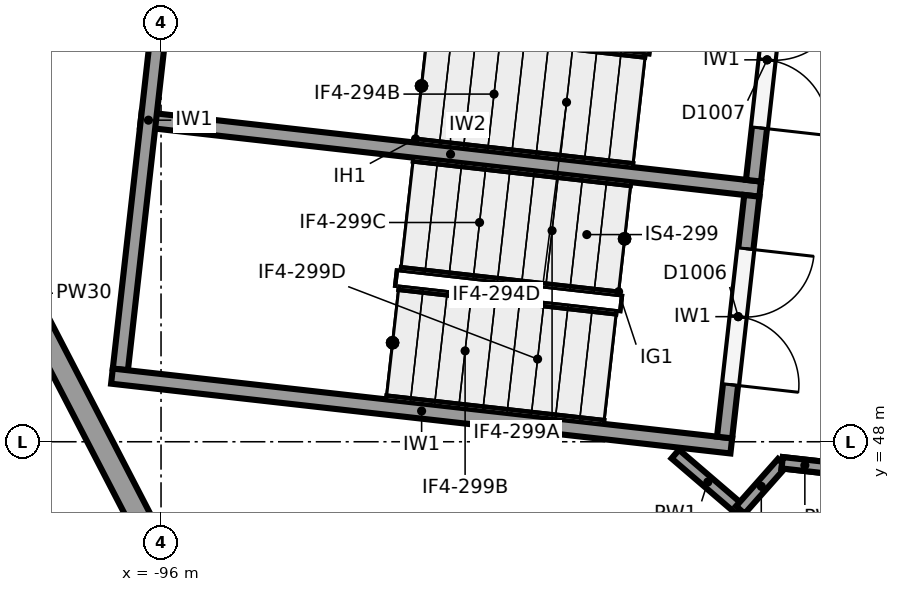
"""IFC4 building model, lengths in metres.
Left out: names, types, materials, properties, quantities, classifications, styles, units other than length and angle.
Written with IfcOpenShell. Run it as: python <this file> out.ifc"""

import sys

from ifc_helpers import new_model, si_unit, direction, frame, frame_2d, origin, place, context, subcontext, project, spatial, rectangle, extrude, element, fill, save


model = new_model("IFC4")
c1 = context("Model", 3, precision=1e-05, world=origin(), true_north=direction((0.0, 1.0)))
c2 = subcontext(c1, "Body", "Model", "MODEL_VIEW")
j1 = project(units=[si_unit("LENGTHUNIT", "METRE"), si_unit("PLANEANGLEUNIT", "RADIAN")], contexts=[c1])
p1 = place(None, origin())
s1 = spatial("IfcSite", under=j1, at=p1, CompositionType="ELEMENT")
p2 = place(p1, origin())
s2 = spatial("IfcBuilding", under=s1, at=p2, CompositionType="ELEMENT")
p3 = place(p2, frame((0.0, 0.0, 12.0)))
s3 = spatial("IfcBuildingStorey", under=s2, at=p3, CompositionType="ELEMENT", Elevation=12.0)
p4 = place(p3, frame((-94.807, 44.149, 0.0), z_axis=(0.0, 0.0, 1.0), x_axis=(-0.460021193284, 0.887907935391, 0.0)))
e1 = element("IfcWall", 1, at=p4, inside=s3, PredefinedType="SOLIDWALL", context=c2, shape_type="SweptSolid", body=[
    extrude(rectangle(XDim=13.075, YDim=0.3, at=frame_2d((6.538, 0.0))), origin(), (0.0, 0.0, 1.0), 4.35),
])
p5 = place(p3, frame((-96.646, 48.863, 0.0), z_axis=(0.0, 0.0, 1.0), x_axis=(0.993714104693, -0.111947658007, 0.0)))
e2 = element("IfcWall", 2, at=p5, inside=s3, PredefinedType="SHEAR", context=c2, shape_type="SweptSolid", body=[
    extrude(rectangle(XDim=8.2, YDim=0.2, at=frame_2d((4.1, 0.0))), origin(), (0.0, 0.0, 1.0), 5.65),
])
p6 = place(p3, frame((-95.796, 55.51, 0.0), z_axis=(0.0, 0.0, 1.0), x_axis=(-0.111970106426, -0.993711575492, 0.0)))
e3 = element("IfcWall", 3, at=p6, inside=s3, PredefinedType="SHEAR", context=c2, shape_type="SweptSolid", body=[
    extrude(rectangle(XDim=6.6, YDim=0.2, at=frame_2d((3.3, 0.0))), origin(), (0.0, 0.0, 1.0), 5.65),
])
p7 = place(p3, frame((-96.265, 52.242, 0.0), z_axis=(0.0, 0.0, 1.0), x_axis=(0.993713731549, -0.111950970206, 0.0)))
e4 = element("IfcWall", 4, at=p7, inside=s3, PredefinedType="SHEAR", context=c2, shape_type="SweptSolid", body=[
    extrude(rectangle(XDim=8.2, YDim=0.2, at=frame_2d((4.1, 0.0))), origin(), (0.0, 0.0, 1.0), 5.65),
])
p8 = place(p3, frame((-87.846, 54.614, 0.0), z_axis=(0.0, 0.0, 1.0), x_axis=(-0.112005735442, -0.993707560215, 0.0)))
e5 = element("IfcWall", 5, at=p8, inside=s3, PredefinedType="SHEAR", context=c2, shape_type="SweptSolid", body=[
    extrude(rectangle(XDim=3.2, YDim=0.2, at=frame_2d((1.6, 0.0))), origin(), (0.0, 0.0, 1.0), 5.65),
])
p9 = place(p8, frame((0.7, 0.0, 0.0)))
e6 = element("IfcOpeningElement", 6, at=p9, cuts=e5, PredefinedType="OPENING", context=c2, shape_type="SweptSolid", body=[
    extrude(rectangle(XDim=1.8, YDim=2.1, at=frame_2d((0.9, 1.05))), frame((0.0, 0.11, 0.0), z_axis=(0.0, -1.0, 0.0), x_axis=(1.0, 0.0, 0.0)), (0.0, 0.0, 1.0), 0.22),
])
p10 = place(p3, frame((-88.227, 51.236, 0.0), z_axis=(0.0, 0.0, 1.0), x_axis=(-0.111930393474, -0.993716049491, 0.0)))
e7 = element("IfcWall", 7, at=p10, inside=s3, PredefinedType="SHEAR", context=c2, shape_type="SweptSolid", body=[
    extrude(rectangle(XDim=3.2, YDim=0.2, at=frame_2d((1.6, 0.0))), origin(), (0.0, 0.0, 1.0), 5.65),
])
p11 = place(p10, frame((0.7, 0.0, 0.0)))
e8 = element("IfcOpeningElement", 8, at=p11, cuts=e7, PredefinedType="OPENING", context=c2, shape_type="SweptSolid", body=[
    extrude(rectangle(XDim=1.8, YDim=2.1, at=frame_2d((0.9, 1.05))), frame((0.0, 0.11, 0.0), z_axis=(0.0, -1.0, 0.0), x_axis=(1.0, 0.0, 0.0)), (0.0, 0.0, 1.0), 0.22),
])
p12 = place(p3, frame((-89.234, 47.837, 0.0), z_axis=(0.0, 0.0, 1.0), x_axis=(0.758950911089, -0.651147843855, 0.0)))
e9 = element("IfcWall", 9, at=p12, inside=s3, PredefinedType="PARTITIONING", context=c2, shape_type="SweptSolid", body=[
    extrude(rectangle(XDim=1.128, YDim=0.15, at=frame_2d((0.564, 0.0))), origin(), (0.0, 0.0, 1.0), 5.65),
])
p13 = place(p3, frame((-88.378, 47.103, 0.0), z_axis=(0.0, 0.0, 1.0), x_axis=(0.66330376879, 0.748350259109, 0.0)))
e10 = element("IfcWall", 10, at=p13, inside=s3, PredefinedType="PARTITIONING", context=c2, shape_type="SweptSolid", body=[
    extrude(rectangle(XDim=0.83, YDim=0.15, at=frame_2d((0.415, 0.0))), origin(), (0.0, 0.0, 1.0), 5.65),
])
p14 = place(p3, frame((-87.827, 47.724, 0.0), z_axis=(0.0, 0.0, 1.0), x_axis=(0.993708869306, -0.11199412066, 0.0)))
e11 = element("IfcWall", 11, at=p14, inside=s3, PredefinedType="PARTITIONING", context=c2, shape_type="SweptSolid", body=[
    extrude(rectangle(XDim=3.704, YDim=0.15, at=frame_2d((1.852, 0.0))), origin(), (0.0, 0.0, 1.0), 4.55),
])
p15 = place(p14, frame((0.65, 0.0, 0.0)))
e12 = element("IfcOpeningElement", 12, at=p15, cuts=e11, PredefinedType="OPENING", context=c2, shape_type="SweptSolid", body=[
    extrude(rectangle(XDim=1.8, YDim=2.1, at=frame_2d((0.9, 1.05))), frame((0.0, 0.085, 0.0), z_axis=(0.0, -1.0, 0.0), x_axis=(1.0, 0.0, 0.0)), (0.0, 0.0, 1.0), 0.17),
])
p16 = place(p3, frame((-87.827, 47.724, 4.55), z_axis=(0.0, 0.0, 1.0), x_axis=(0.993673547442, -0.112307083986, 0.0)))
e13 = element("IfcWall", 13, at=p16, inside=s3, PredefinedType="PARTITIONING", context=c2, shape_type="SweptSolid", body=[
    extrude(rectangle(XDim=0.6, YDim=0.15, at=frame_2d((0.3, 0.0))), origin(), (0.0, 0.0, 1.0), 1.1),
])
p17 = place(p9, origin())
e14 = element("IfcDoor", 14, at=p17, inside=s3, OperationType="DOUBLE_DOOR_SINGLE_SWING", PredefinedType="DOOR", context=c2, shape_type="SweptSolid", body=[
    extrude(rectangle(XDim=1.8, YDim=2.1, at=frame_2d((0.9, 1.05))), frame((0.0, 0.025, 0.0), z_axis=(0.0, -1.0, 0.0), x_axis=(1.0, 0.0, 0.0)), (0.0, 0.0, 1.0), 0.05),
])
fill(e6, e14)
p18 = place(p11, origin())
e15 = element("IfcDoor", 15, at=p18, inside=s3, OperationType="DOUBLE_DOOR_SINGLE_SWING", PredefinedType="DOOR", context=c2, shape_type="SweptSolid", body=[
    extrude(rectangle(XDim=1.8, YDim=2.1, at=frame_2d((0.9, 1.05))), frame((0.0, 0.025, 0.0), z_axis=(0.0, -1.0, 0.0), x_axis=(1.0, 0.0, 0.0)), (0.0, 0.0, 1.0), 0.05),
])
fill(e8, e15)
save(model, sys.argv[1])
